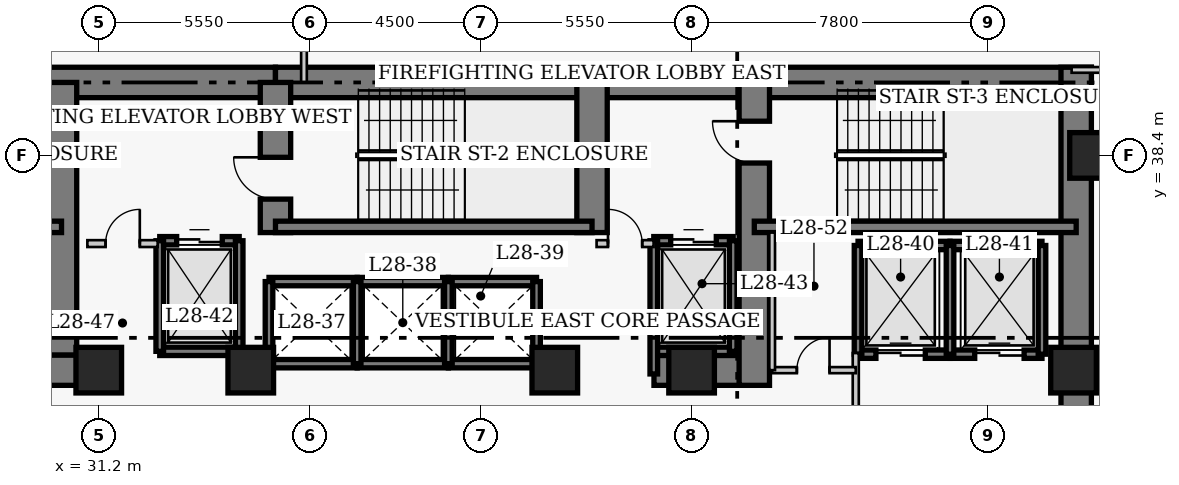
"""IFC4 building model, lengths in metres.
Left out: names, types, materials, properties, quantities, classifications, styles, units other than length and angle.
Written with IfcOpenShell. Run it as: python <this file> out.ifc"""

import sys

from ifc_helpers import new_model, si_unit, direction, frame, frame_2d, origin, origin_2d, place, context, subcontext, project, spatial, rectangle, extrude, element, fill, save


model = new_model("IFC4")
c1 = context("Model", 3, precision=1e-05, world=origin(), true_north=direction((0.0, 1.0)))
c2 = subcontext(c1, "Body", "Model", "MODEL_VIEW")
j1 = project(units=[si_unit("LENGTHUNIT", "METRE"), si_unit("PLANEANGLEUNIT", "RADIAN")], contexts=[c1])
p1 = place(None, origin())
s1 = spatial("IfcSite", under=j1, at=p1, CompositionType="ELEMENT")
p2 = place(p1, origin())
s2 = spatial("IfcBuilding", under=s1, at=p2, CompositionType="ELEMENT")
p3 = place(p2, frame((0.0, 0.0, 114.6)))
s3 = spatial("IfcBuildingStorey", under=s2, at=p3, CompositionType="ELEMENT", Elevation=114.6)
p4 = place(p3, frame((21.5, 40.32, 0.0), z_axis=(0.0, 0.0, 1.0), x_axis=(1.0, 0.0, 0.0)))
e1 = element("IfcWall", 1, at=p4, inside=s3, PredefinedType="SHEAR", context=c2, shape_type="SweptSolid", body=[
    extrude(rectangle(XDim=14.35, YDim=0.8, at=frame_2d((7.175, 0.0))), origin(), (0.0, 0.0, 1.0), 3.8),
])
p5 = place(p3, frame((35.85, 40.32, 0.0), z_axis=(0.0, 0.0, 1.0), x_axis=(1.0, 0.0, 0.0)))
e2 = element("IfcWall", 2, at=p5, inside=s3, PredefinedType="SHEAR", context=c2, shape_type="SweptSolid", body=[
    extrude(rectangle(XDim=12.6, YDim=0.8, at=frame_2d((6.3, 0.0))), origin(), (0.0, 0.0, 1.0), 3.8),
])
p6 = place(p3, frame((48.45, 40.32, 0.0), z_axis=(0.0, 0.0, 1.0), x_axis=(1.0, 0.0, 0.0)))
e3 = element("IfcWall", 3, at=p6, inside=s3, PredefinedType="SHEAR", context=c2, shape_type="SweptSolid", body=[
    extrude(rectangle(XDim=8.87, YDim=0.8, at=frame_2d((4.435, 0.0))), origin(), (0.0, 0.0, 1.0), 3.8),
])
p7 = place(p3, frame((56.92, 27.05, 0.0), z_axis=(0.0, 0.0, 1.0), x_axis=(0.0, 1.0, 0.0)))
e4 = element("IfcWall", 4, at=p7, inside=s3, PredefinedType="SHEAR", context=c2, shape_type="SweptSolid", body=[
    extrude(rectangle(XDim=13.67, YDim=0.8, at=frame_2d((6.835, 0.0))), origin(), (0.0, 0.0, 1.0), 3.8),
])
p8 = place(p3, frame((28.45, 32.75, 0.0), z_axis=(0.0, 0.0, 1.0), x_axis=(1.0, 0.0, 0.0)))
e5 = element("IfcWall", 5, at=p8, inside=s3, PredefinedType="SHEAR", context=c2, shape_type="SweptSolid", body=[
    extrude(rectangle(XDim=2.4, YDim=0.8, at=frame_2d((1.2, 0.0))), origin(), (0.0, 0.0, 1.0), 3.8),
])
p9 = place(p3, frame((45.81, 32.75, 0.0), z_axis=(0.0, 0.0, 1.0), x_axis=(1.0, 0.0, 0.0)))
e6 = element("IfcWall", 6, at=p9, inside=s3, PredefinedType="SHEAR", context=c2, shape_type="SweptSolid", body=[
    extrude(rectangle(XDim=2.64, YDim=0.8, at=frame_2d((1.32, 0.0))), origin(), (0.0, 0.0, 1.0), 3.8),
])
p10 = place(p3, frame((30.22, 33.15, 0.0), z_axis=(0.0, 0.0, 1.0), x_axis=(0.0, 1.0, 0.0)))
e7 = element("IfcWall", 7, at=p10, inside=s3, PredefinedType="SHEAR", context=c2, shape_type="SweptSolid", body=[
    extrude(rectangle(XDim=7.17, YDim=0.8, at=frame_2d((3.585, 0.0))), origin(), (0.0, 0.0, 1.0), 3.8),
])
p11 = place(p3, frame((35.85, 36.37, 0.0), z_axis=(0.0, 0.0, 1.0), x_axis=(0.0, 1.0, 0.0)))
e8 = element("IfcWall", 8, at=p11, inside=s3, PredefinedType="SHEAR", context=c2, shape_type="SweptSolid", body=[
    extrude(rectangle(XDim=3.95, YDim=0.8, at=frame_2d((1.975, 0.0))), origin(), (0.0, 0.0, 1.0), 3.8),
])
p12 = place(p11, frame((0.88, 0.0, 0.0)))
e9 = element("IfcOpeningElement", 9, at=p12, cuts=e8, PredefinedType="OPENING", context=c2, shape_type="SweptSolid", body=[
    extrude(rectangle(XDim=1.1, YDim=2.15, at=frame_2d((0.55, 1.075))), frame((0.0, 0.41, 0.0), z_axis=(0.0, -1.0, 0.0), x_axis=(1.0, 0.0, 0.0)), (0.0, 0.0, 1.0), 0.82),
])
p13 = place(p3, frame((44.18, 36.37, 0.0), z_axis=(0.0, 0.0, 1.0), x_axis=(0.0, 1.0, 0.0)))
e10 = element("IfcWall", 10, at=p13, inside=s3, PredefinedType="SHEAR", context=c2, shape_type="SweptSolid", body=[
    extrude(rectangle(XDim=3.95, YDim=0.8, at=frame_2d((1.975, 0.0))), origin(), (0.0, 0.0, 1.0), 3.8),
])
p14 = place(p3, frame((48.45, 32.35, 0.0), z_axis=(0.0, 0.0, 1.0), x_axis=(0.0, 1.0, 0.0)))
e11 = element("IfcWall", 11, at=p14, inside=s3, PredefinedType="SHEAR", context=c2, shape_type="SweptSolid", body=[
    extrude(rectangle(XDim=7.97, YDim=0.8, at=frame_2d((3.985, 0.0))), origin(), (0.0, 0.0, 1.0), 3.8),
])
p15 = place(p14, frame((5.85, 0.0, 0.0)))
e12 = element("IfcOpeningElement", 12, at=p15, cuts=e11, PredefinedType="OPENING", context=c2, shape_type="SweptSolid", body=[
    extrude(rectangle(XDim=1.1, YDim=2.15, at=frame_2d((0.55, 1.075))), frame((0.0, 0.41, 0.0), z_axis=(0.0, -1.0, 0.0), x_axis=(1.0, 0.0, 0.0)), (0.0, 0.0, 1.0), 0.82),
])
p16 = place(p3, frame((21.9, 36.52, 0.0), z_axis=(0.0, 0.0, 1.0), x_axis=(1.0, 0.0, 0.0)))
e13 = element("IfcWall", 13, at=p16, inside=s3, PredefinedType="SHEAR", context=c2, shape_type="SweptSolid", body=[
    extrude(rectangle(XDim=8.32, YDim=0.3, at=frame_2d((4.16, 0.0))), origin(), (0.0, 0.0, 1.0), 3.8),
])
p17 = place(p16, frame((0.9, 0.0, 0.0)))
e14 = element("IfcOpeningElement", 14, at=p17, cuts=e13, PredefinedType="OPENING", context=c2, shape_type="SweptSolid", body=[
    extrude(rectangle(XDim=1.1, YDim=2.15, at=frame_2d((0.55, 1.075))), frame((0.0, 0.16, 0.0), z_axis=(0.0, -1.0, 0.0), x_axis=(1.0, 0.0, 0.0)), (0.0, 0.0, 1.0), 0.32),
])
p18 = place(p3, frame((35.85, 36.52, 0.0), z_axis=(0.0, 0.0, 1.0), x_axis=(1.0, 0.0, 0.0)))
e15 = element("IfcWall", 15, at=p18, inside=s3, PredefinedType="SHEAR", context=c2, shape_type="SweptSolid", body=[
    extrude(rectangle(XDim=8.33, YDim=0.3, at=frame_2d((4.165, 0.0))), origin(), (0.0, 0.0, 1.0), 3.8),
])
p19 = place(p3, frame((48.45, 36.52, 0.0), z_axis=(0.0, 0.0, 1.0), x_axis=(1.0, 0.0, 0.0)))
e16 = element("IfcWall", 16, at=p19, inside=s3, PredefinedType="SHEAR", context=c2, shape_type="SweptSolid", body=[
    extrude(rectangle(XDim=8.47, YDim=0.3, at=frame_2d((4.235, 0.0))), origin(), (0.0, 0.0, 1.0), 3.8),
])
for number, where, z_axis, x_axis in (
    (17, (57.35, 38.4, 0.0), (0.0, 0.0, 1.0), (1.0, 0.0, 0.0)),
    (18, (31.2, 32.75, 0.0), (0.0, 0.0, 1.0), (1.0, 0.0, 0.0)),
    (19, (35.2, 32.75, 0.0), (0.0, 0.0, 1.0), (1.0, 0.0, 0.0)),
    (20, (43.2, 32.75, 0.0), (0.0, 0.0, 1.0), (1.0, 0.0, 0.0)),
    (21, (46.8, 32.75, 0.0), (0.0, 0.0, 1.0), (1.0, 0.0, 0.0)),
    (22, (56.85, 32.75, 0.0), (0.0, 0.0, 1.0), (1.0, 0.0, 0.0)),
):
    element("IfcColumn", number, at=place(p3, frame(where, z_axis=z_axis, x_axis=x_axis)), inside=s3, PredefinedType="COLUMN", context=c2, shape_type="SweptSolid", body=[
        extrude(rectangle(XDim=1.2, YDim=1.2, at=origin_2d()), origin(), (0.0, 0.0, 1.0), 3.8),
    ])
for number, where, z_axis, x_axis in (
    (23, (35.68, 35.08, 0.0), (0.0, 0.0, 1.0), (1.0, 0.0, 0.0)),
    (24, (35.68, 32.92, 0.0), (0.0, 0.0, 1.0), (1.0, 0.0, 0.0)),
):
    element("IfcWall", number, at=place(p3, frame(where, z_axis=z_axis, x_axis=x_axis)), inside=s3, PredefinedType="SHEAR", context=c2, shape_type="SweptSolid", body=[
        extrude(rectangle(XDim=2.32, YDim=0.22, at=frame_2d((1.16, 0.0))), origin(), (0.0, 0.0, 1.0), 3.8),
    ])
p20 = place(p3, frame((35.68, 32.92, 0.0), z_axis=(0.0, 0.0, 1.0), x_axis=(0.0, 1.0, 0.0)))
e25 = element("IfcWall", 25, at=p20, inside=s3, PredefinedType="SHEAR", context=c2, shape_type="SweptSolid", body=[
    extrude(rectangle(XDim=2.16, YDim=0.2, at=frame_2d((1.08, 0.0))), origin(), (0.0, 0.0, 1.0), 3.8),
])
for number, where, z_axis, x_axis in (
    (26, (38.0, 35.08, 0.0), (0.0, 0.0, 1.0), (1.0, 0.0, 0.0)),
    (27, (38.0, 32.92, 0.0), (0.0, 0.0, 1.0), (1.0, 0.0, 0.0)),
):
    element("IfcWall", number, at=place(p3, frame(where, z_axis=z_axis, x_axis=x_axis)), inside=s3, PredefinedType="SHEAR", context=c2, shape_type="SweptSolid", body=[
        extrude(rectangle(XDim=2.4, YDim=0.22, at=frame_2d((1.2, 0.0))), origin(), (0.0, 0.0, 1.0), 3.8),
    ])
p21 = place(p3, frame((38.0, 32.92, 0.0), z_axis=(0.0, 0.0, 1.0), x_axis=(0.0, 1.0, 0.0)))
e28 = element("IfcWall", 28, at=p21, inside=s3, PredefinedType="SHEAR", context=c2, shape_type="SweptSolid", body=[
    extrude(rectangle(XDim=2.16, YDim=0.2, at=frame_2d((1.08, 0.0))), origin(), (0.0, 0.0, 1.0), 3.8),
])
for number, where, z_axis, x_axis in (
    (29, (40.4, 35.08, 0.0), (0.0, 0.0, 1.0), (1.0, 0.0, 0.0)),
    (30, (40.4, 32.92, 0.0), (0.0, 0.0, 1.0), (1.0, 0.0, 0.0)),
):
    element("IfcWall", number, at=place(p3, frame(where, z_axis=z_axis, x_axis=x_axis)), inside=s3, PredefinedType="SHEAR", context=c2, shape_type="SweptSolid", body=[
        extrude(rectangle(XDim=2.32, YDim=0.22, at=frame_2d((1.16, 0.0))), origin(), (0.0, 0.0, 1.0), 3.8),
    ])
for number, where, z_axis, x_axis in (
    (31, (40.4, 32.92, 0.0), (0.0, 0.0, 1.0), (0.0, 1.0, 0.0)),
    (32, (42.72, 32.92, 0.0), (0.0, 0.0, 1.0), (0.0, 1.0, 0.0)),
):
    element("IfcWall", number, at=place(p3, frame(where, z_axis=z_axis, x_axis=x_axis)), inside=s3, PredefinedType="SHEAR", context=c2, shape_type="SweptSolid", body=[
        extrude(rectangle(XDim=2.16, YDim=0.2, at=frame_2d((1.08, 0.0))), origin(), (0.0, 0.0, 1.0), 3.8),
    ])
p22 = place(p3, frame((51.18, 36.03, 0.0), z_axis=(0.0, 0.0, 1.0), x_axis=(1.0, 0.0, 0.0)))
e33 = element("IfcWall", 33, at=p22, inside=s3, PredefinedType="SHEAR", context=c2, shape_type="SweptSolid", body=[
    extrude(rectangle(XDim=2.42, YDim=0.22, at=frame_2d((1.21, 0.0))), origin(), (0.0, 0.0, 1.0), 3.8),
])
p23 = place(p3, frame((51.18, 33.17, 0.0), z_axis=(0.0, 0.0, 1.0), x_axis=(1.0, 0.0, 0.0)))
e34 = element("IfcWall", 34, at=p23, inside=s3, PredefinedType="SHEAR", context=c2, shape_type="SweptSolid", body=[
    extrude(rectangle(XDim=2.42, YDim=0.22, at=frame_2d((1.21, 0.0))), origin(), (0.0, 0.0, 1.0), 3.8),
])
p24 = place(p23, frame((0.47, 0.0, 0.0)))
e35 = element("IfcOpeningElement", 35, at=p24, cuts=e34, PredefinedType="OPENING", context=c2, shape_type="SweptSolid", body=[
    extrude(rectangle(XDim=1.3, YDim=2.15, at=frame_2d((0.65, 1.075))), frame((0.0, 0.12, 0.0), z_axis=(0.0, -1.0, 0.0), x_axis=(1.0, 0.0, 0.0)), (0.0, 0.0, 1.0), 0.24),
])
p25 = place(p3, frame((51.18, 33.17, 0.0), z_axis=(0.0, 0.0, 1.0), x_axis=(0.0, 1.0, 0.0)))
e36 = element("IfcWall", 36, at=p25, inside=s3, PredefinedType="SHEAR", context=c2, shape_type="SweptSolid", body=[
    extrude(rectangle(XDim=2.86, YDim=0.2, at=frame_2d((1.43, 0.0))), origin(), (0.0, 0.0, 1.0), 3.8),
])
p26 = place(p3, frame((53.6, 36.03, 0.0), z_axis=(0.0, 0.0, 1.0), x_axis=(1.0, 0.0, 0.0)))
e37 = element("IfcWall", 37, at=p26, inside=s3, PredefinedType="SHEAR", context=c2, shape_type="SweptSolid", body=[
    extrude(rectangle(XDim=2.42, YDim=0.22, at=frame_2d((1.21, 0.0))), origin(), (0.0, 0.0, 1.0), 3.8),
])
p27 = place(p3, frame((53.6, 33.17, 0.0), z_axis=(0.0, 0.0, 1.0), x_axis=(1.0, 0.0, 0.0)))
e38 = element("IfcWall", 38, at=p27, inside=s3, PredefinedType="SHEAR", context=c2, shape_type="SweptSolid", body=[
    extrude(rectangle(XDim=2.42, YDim=0.22, at=frame_2d((1.21, 0.0))), origin(), (0.0, 0.0, 1.0), 3.8),
])
p28 = place(p27, frame((0.65, 0.0, 0.0)))
e39 = element("IfcOpeningElement", 39, at=p28, cuts=e38, PredefinedType="OPENING", context=c2, shape_type="SweptSolid", body=[
    extrude(rectangle(XDim=1.3, YDim=2.15, at=frame_2d((0.65, 1.075))), frame((0.0, 0.12, 0.0), z_axis=(0.0, -1.0, 0.0), x_axis=(1.0, 0.0, 0.0)), (0.0, 0.0, 1.0), 0.24),
])
for number, where, z_axis, x_axis in (
    (40, (53.6, 33.17, 0.0), (0.0, 0.0, 1.0), (0.0, 1.0, 0.0)),
    (41, (56.02, 33.17, 0.0), (0.0, 0.0, 1.0), (0.0, 1.0, 0.0)),
):
    element("IfcWall", number, at=place(p3, frame(where, z_axis=z_axis, x_axis=x_axis)), inside=s3, PredefinedType="SHEAR", context=c2, shape_type="SweptSolid", body=[
        extrude(rectangle(XDim=2.86, YDim=0.2, at=frame_2d((1.43, 0.0))), origin(), (0.0, 0.0, 1.0), 3.8),
    ])
p29 = place(p3, frame((32.805, 36.155, 0.0), z_axis=(0.0, 0.0, 1.0), x_axis=(1.0, 0.0, 0.0)))
e42 = element("IfcWall", 42, at=p29, inside=s3, PredefinedType="SHEAR", context=c2, shape_type="SweptSolid", body=[
    extrude(rectangle(XDim=2.09, YDim=0.22, at=frame_2d((1.045, 0.0))), origin(), (0.0, 0.0, 1.0), 3.8),
])
p30 = place(p29, frame((0.445, 0.0, 0.0)))
e43 = element("IfcOpeningElement", 43, at=p30, cuts=e42, PredefinedType="OPENING", context=c2, shape_type="SweptSolid", body=[
    extrude(rectangle(XDim=1.2, YDim=2.15, at=frame_2d((0.6, 1.075))), frame((0.0, 0.12, 0.0), z_axis=(0.0, -1.0, 0.0), x_axis=(1.0, 0.0, 0.0)), (0.0, 0.0, 1.0), 0.24),
])
p31 = place(p3, frame((32.805, 33.245, 0.0), z_axis=(0.0, 0.0, 1.0), x_axis=(1.0, 0.0, 0.0)))
e44 = element("IfcWall", 44, at=p31, inside=s3, PredefinedType="SHEAR", context=c2, shape_type="SweptSolid", body=[
    extrude(rectangle(XDim=2.09, YDim=0.22, at=frame_2d((1.045, 0.0))), origin(), (0.0, 0.0, 1.0), 3.8),
])
for number, where, z_axis, x_axis in (
    (45, (32.805, 33.245, 0.0), (0.0, 0.0, 1.0), (0.0, 1.0, 0.0)),
    (46, (34.895, 33.245, 0.0), (0.0, 0.0, 1.0), (0.0, 1.0, 0.0)),
):
    element("IfcWall", number, at=place(p3, frame(where, z_axis=z_axis, x_axis=x_axis)), inside=s3, PredefinedType="SHEAR", context=c2, shape_type="SweptSolid", body=[
        extrude(rectangle(XDim=2.91, YDim=0.2, at=frame_2d((1.455, 0.0))), origin(), (0.0, 0.0, 1.0), 3.8),
    ])
p32 = place(p3, frame((45.805, 36.155, 0.0), z_axis=(0.0, 0.0, 1.0), x_axis=(1.0, 0.0, 0.0)))
e47 = element("IfcWall", 47, at=p32, inside=s3, PredefinedType="SHEAR", context=c2, shape_type="SweptSolid", body=[
    extrude(rectangle(XDim=2.09, YDim=0.22, at=frame_2d((1.045, 0.0))), origin(), (0.0, 0.0, 1.0), 3.8),
])
p33 = place(p32, frame((0.445, 0.0, 0.0)))
e48 = element("IfcOpeningElement", 48, at=p33, cuts=e47, PredefinedType="OPENING", context=c2, shape_type="SweptSolid", body=[
    extrude(rectangle(XDim=1.2, YDim=2.15, at=frame_2d((0.6, 1.075))), frame((0.0, 0.12, 0.0), z_axis=(0.0, -1.0, 0.0), x_axis=(1.0, 0.0, 0.0)), (0.0, 0.0, 1.0), 0.24),
])
p34 = place(p3, frame((45.805, 33.245, 0.0), z_axis=(0.0, 0.0, 1.0), x_axis=(1.0, 0.0, 0.0)))
e49 = element("IfcWall", 49, at=p34, inside=s3, PredefinedType="SHEAR", context=c2, shape_type="SweptSolid", body=[
    extrude(rectangle(XDim=2.09, YDim=0.22, at=frame_2d((1.045, 0.0))), origin(), (0.0, 0.0, 1.0), 3.8),
])
p35 = place(p3, frame((45.805, 32.65, 0.0), z_axis=(0.0, 0.0, 1.0), x_axis=(0.0, 1.0, 0.0)))
e50 = element("IfcWall", 50, at=p35, inside=s3, PredefinedType="SHEAR", context=c2, shape_type="SweptSolid", body=[
    extrude(rectangle(XDim=3.505, YDim=0.2, at=frame_2d((1.752, 0.0))), origin(), (0.0, 0.0, 1.0), 3.8),
])
p36 = place(p3, frame((47.895, 33.245, 0.0), z_axis=(0.0, 0.0, 1.0), x_axis=(0.0, 1.0, 0.0)))
e51 = element("IfcWall", 51, at=p36, inside=s3, PredefinedType="SHEAR", context=c2, shape_type="SweptSolid", body=[
    extrude(rectangle(XDim=2.91, YDim=0.2, at=frame_2d((1.455, 0.0))), origin(), (0.0, 0.0, 1.0), 3.8),
])
p37 = place(p3, frame((30.9, 36.08, 0.0), z_axis=(0.0, 0.0, 1.0), x_axis=(1.0, 0.0, 0.0)))
e52 = element("IfcWall", 52, at=p37, inside=s3, PredefinedType="PARTITIONING", context=c2, shape_type="SweptSolid", body=[
    extrude(rectangle(XDim=1.85, YDim=0.18, at=frame_2d((0.925, 0.0))), origin(), (0.0, 0.0, 1.0), 3.54),
])
p38 = place(p37, frame((0.48, 0.0, 0.0)))
e53 = element("IfcOpeningElement", 53, at=p38, cuts=e52, PredefinedType="OPENING", context=c2, shape_type="SweptSolid", body=[
    extrude(rectangle(XDim=0.9, YDim=2.15, at=frame_2d((0.45, 1.075))), frame((0.0, 0.1, 0.0), z_axis=(0.0, -1.0, 0.0), x_axis=(1.0, 0.0, 0.0)), (0.0, 0.0, 1.0), 0.2),
])
p39 = place(p3, frame((44.3, 36.08, 0.0), z_axis=(0.0, 0.0, 1.0), x_axis=(1.0, 0.0, 0.0)))
e54 = element("IfcWall", 54, at=p39, inside=s3, PredefinedType="PARTITIONING", context=c2, shape_type="SweptSolid", body=[
    extrude(rectangle(XDim=1.5, YDim=0.18, at=frame_2d((0.75, 0.0))), origin(), (0.0, 0.0, 1.0), 3.54),
])
p40 = place(p39, frame((0.3, 0.0, 0.0)))
e55 = element("IfcOpeningElement", 55, at=p40, cuts=e54, PredefinedType="OPENING", context=c2, shape_type="SweptSolid", body=[
    extrude(rectangle(XDim=0.9, YDim=2.15, at=frame_2d((0.45, 1.075))), frame((0.0, 0.1, 0.0), z_axis=(0.0, -1.0, 0.0), x_axis=(1.0, 0.0, 0.0)), (0.0, 0.0, 1.0), 0.2),
])
p41 = place(p3, frame((51.12, 29.5, 0.0), z_axis=(0.0, 0.0, 1.0), x_axis=(0.0, 1.0, 0.0)))
e56 = element("IfcWall", 56, at=p41, inside=s3, PredefinedType="PARTITIONING", context=c2, shape_type="SweptSolid", body=[
    extrude(rectangle(XDim=3.7, YDim=0.16, at=frame_2d((1.85, 0.0))), origin(), (0.0, 0.0, 1.0), 3.54),
])
p42 = place(p41, frame((0.9, 0.0, 0.0)))
e57 = element("IfcOpeningElement", 57, at=p42, cuts=e56, PredefinedType="OPENING", context=c2, shape_type="SweptSolid", body=[
    extrude(rectangle(XDim=1.1, YDim=2.15, at=frame_2d((0.55, 1.075))), frame((0.0, 0.09, 0.0), z_axis=(0.0, -1.0, 0.0), x_axis=(1.0, 0.0, 0.0)), (0.0, 0.0, 1.0), 0.18),
])
p43 = place(p3, frame((48.92, 32.75, 0.0), z_axis=(0.0, 0.0, 1.0), x_axis=(1.0, 0.0, 0.0)))
e58 = element("IfcWall", 58, at=p43, inside=s3, PredefinedType="PARTITIONING", context=c2, shape_type="SweptSolid", body=[
    extrude(rectangle(XDim=2.2, YDim=0.16, at=frame_2d((1.1, 0.0))), origin(), (0.0, 0.0, 1.0), 3.54),
])
p44 = place(p43, frame((0.65, 0.0, 0.0)))
e59 = element("IfcOpeningElement", 59, at=p44, cuts=e58, PredefinedType="OPENING", context=c2, shape_type="SweptSolid", body=[
    extrude(rectangle(XDim=0.86, YDim=2.05, at=frame_2d((0.43, 1.025))), frame((0.0, 0.09, 0.0), z_axis=(0.0, -1.0, 0.0), x_axis=(1.0, 0.0, 0.0)), (0.0, 0.0, 1.0), 0.18),
])
p45 = place(p3, frame((48.92, 32.75, 0.0), z_axis=(0.0, 0.0, 1.0), x_axis=(0.0, 1.0, 0.0)))
e60 = element("IfcWall", 60, at=p45, inside=s3, PredefinedType="PARTITIONING", context=c2, shape_type="SweptSolid", body=[
    extrude(rectangle(XDim=3.62, YDim=0.15, at=frame_2d((1.81, 0.0))), origin(), (0.0, 0.0, 1.0), 3.54),
])
p46 = place(p3, frame((56.8, 40.65, 0.0), z_axis=(0.0, 0.0, 1.0), x_axis=(1.0, 0.0, 0.0)))
e61 = element("IfcWall", 61, at=p46, inside=s3, PredefinedType="PARTITIONING", context=c2, shape_type="SweptSolid", body=[
    extrude(rectangle(XDim=4.56, YDim=0.15, at=frame_2d((2.28, 0.0))), origin(), (0.0, 0.0, 1.0), 3.54),
])
p47 = place(p46, frame((2.95, 0.0, 0.0)))
e62 = element("IfcOpeningElement", 62, at=p47, cuts=e61, PredefinedType="OPENING", context=c2, shape_type="SweptSolid", body=[
    extrude(rectangle(XDim=1.0, YDim=2.15, at=frame_2d((0.5, 1.075))), frame((0.0, 0.085, 0.0), z_axis=(0.0, -1.0, 0.0), x_axis=(1.0, 0.0, 0.0)), (0.0, 0.0, 1.0), 0.17),
])
p48 = place(p3, frame((36.6, 40.32, 0.0), z_axis=(0.0, 0.0, 1.0), x_axis=(0.0, 1.0, 0.0)))
e63 = element("IfcWall", 63, at=p48, inside=s3, PredefinedType="PARTITIONING", context=c2, shape_type="SweptSolid", body=[
    extrude(rectangle(XDim=3.445, YDim=0.15, at=frame_2d((1.723, 0.0))), origin(), (0.0, 0.0, 1.0), 3.54),
])
p49 = place(p24, origin())
e64 = element("IfcDoor", 64, at=p49, inside=s3, OperationType="DOUBLE_DOOR_SLIDING", PredefinedType="DOOR", context=c2, shape_type="SweptSolid", body=[
    extrude(rectangle(XDim=1.3, YDim=2.15, at=frame_2d((0.65, 1.075))), frame((0.0, 0.025, 0.0), z_axis=(0.0, -1.0, 0.0), x_axis=(1.0, 0.0, 0.0)), (0.0, 0.0, 1.0), 0.05),
])
fill(e35, e64)
p50 = place(p28, origin())
e65 = element("IfcDoor", 65, at=p50, inside=s3, OperationType="DOUBLE_DOOR_SLIDING", PredefinedType="DOOR", context=c2, shape_type="SweptSolid", body=[
    extrude(rectangle(XDim=1.3, YDim=2.15, at=frame_2d((0.65, 1.075))), frame((0.0, 0.025, 0.0), z_axis=(0.0, -1.0, 0.0), x_axis=(1.0, 0.0, 0.0)), (0.0, 0.0, 1.0), 0.05),
])
fill(e39, e65)
p51 = place(p30, origin())
e66 = element("IfcDoor", 66, at=p51, inside=s3, OperationType="DOUBLE_DOOR_SLIDING", PredefinedType="DOOR", context=c2, shape_type="SweptSolid", body=[
    extrude(rectangle(XDim=1.2, YDim=2.15, at=frame_2d((0.6, 1.075))), frame((0.0, 0.025, 0.0), z_axis=(0.0, -1.0, 0.0), x_axis=(1.0, 0.0, 0.0)), (0.0, 0.0, 1.0), 0.05),
])
fill(e43, e66)
p52 = place(p33, origin())
e67 = element("IfcDoor", 67, at=p52, inside=s3, OperationType="DOUBLE_DOOR_SLIDING", PredefinedType="DOOR", context=c2, shape_type="SweptSolid", body=[
    extrude(rectangle(XDim=1.2, YDim=2.15, at=frame_2d((0.6, 1.075))), frame((0.0, 0.025, 0.0), z_axis=(0.0, -1.0, 0.0), x_axis=(1.0, 0.0, 0.0)), (0.0, 0.0, 1.0), 0.05),
])
fill(e48, e67)
p53 = place(p38, origin())
e68 = element("IfcDoor", 68, at=p53, inside=s3, OperationType="SINGLE_SWING_RIGHT", PredefinedType="DOOR", context=c2, shape_type="SweptSolid", body=[
    extrude(rectangle(XDim=0.9, YDim=2.15, at=frame_2d((0.45, 1.075))), frame((0.0, 0.025, 0.0), z_axis=(0.0, -1.0, 0.0), x_axis=(1.0, 0.0, 0.0)), (0.0, 0.0, 1.0), 0.05),
])
fill(e53, e68)
p54 = place(p40, origin())
e69 = element("IfcDoor", 69, at=p54, inside=s3, OperationType="SINGLE_SWING_LEFT", PredefinedType="DOOR", context=c2, shape_type="SweptSolid", body=[
    extrude(rectangle(XDim=0.9, YDim=2.15, at=frame_2d((0.45, 1.075))), frame((0.0, 0.025, 0.0), z_axis=(0.0, -1.0, 0.0), x_axis=(1.0, 0.0, 0.0)), (0.0, 0.0, 1.0), 0.05),
])
fill(e55, e69)
p55 = place(p44, origin())
e70 = element("IfcDoor", 70, at=p55, inside=s3, OperationType="SINGLE_SWING_RIGHT", PredefinedType="DOOR", context=c2, shape_type="SweptSolid", body=[
    extrude(rectangle(XDim=0.86, YDim=2.05, at=frame_2d((0.43, 1.025))), frame((0.0, 0.025, 0.0), z_axis=(0.0, -1.0, 0.0), x_axis=(1.0, 0.0, 0.0)), (0.0, 0.0, 1.0), 0.05),
])
fill(e59, e70)
p56 = place(p12, origin())
e71 = element("IfcDoor", 71, at=p56, inside=s3, OperationType="SINGLE_SWING_RIGHT", PredefinedType="DOOR", context=c2, shape_type="SweptSolid", body=[
    extrude(rectangle(XDim=1.1, YDim=2.15, at=frame_2d((0.55, 1.075))), frame((0.0, 0.025, 0.0), z_axis=(0.0, -1.0, 0.0), x_axis=(1.0, 0.0, 0.0)), (0.0, 0.0, 1.0), 0.05),
])
fill(e9, e71)
p57 = place(p15, origin())
e72 = element("IfcDoor", 72, at=p57, inside=s3, OperationType="SINGLE_SWING_RIGHT", PredefinedType="DOOR", context=c2, shape_type="SweptSolid", body=[
    extrude(rectangle(XDim=1.1, YDim=2.15, at=frame_2d((0.55, 1.075))), frame((0.0, 0.025, 0.0), z_axis=(0.0, -1.0, 0.0), x_axis=(1.0, 0.0, 0.0)), (0.0, 0.0, 1.0), 0.05),
])
fill(e12, e72)
save(model, sys.argv[1])
